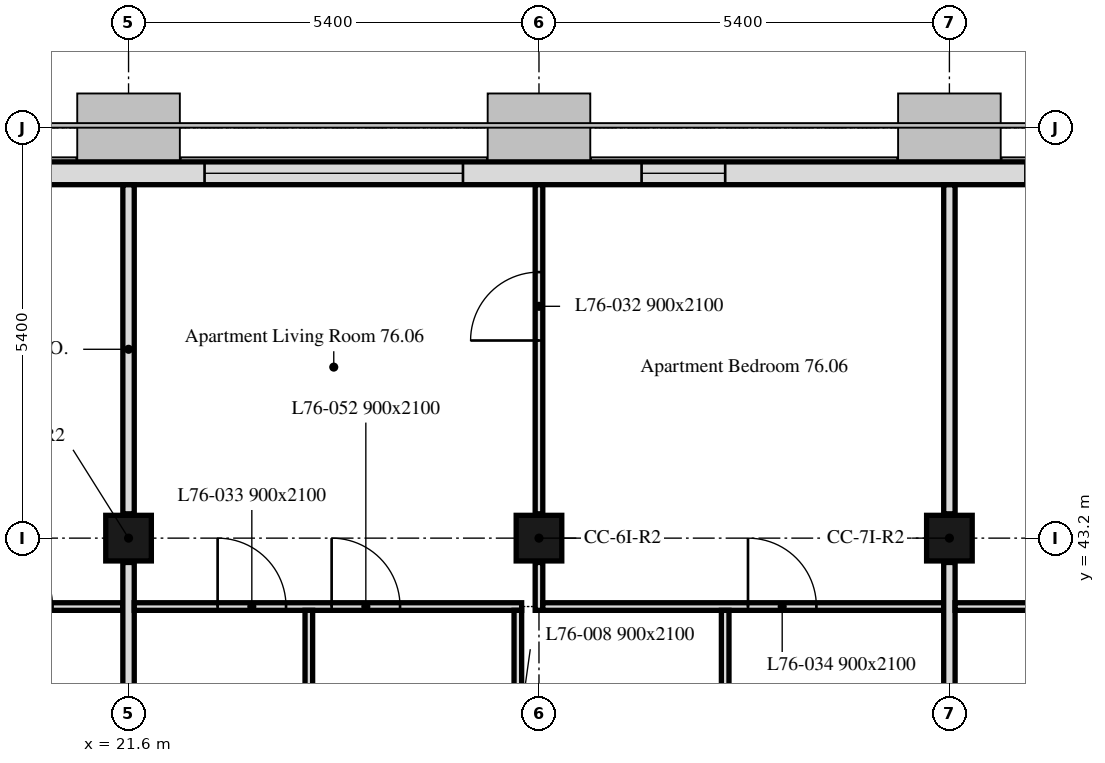
"""IFC4 building model, lengths in metres.
Left out: names, types, materials, properties, quantities, classifications, styles, units other than length and angle.
Written with IfcOpenShell. Run it as: python <this file> out.ifc"""

import sys

from ifc_helpers import new_model, si_unit, direction, frame, frame_2d, origin, origin_2d, place, context, subcontext, project, spatial, rectangle, extrude, element, fill, save


model = new_model("IFC4")
c1 = context("Model", 3, precision=1e-05, world=origin(), true_north=direction((0.0, 1.0)))
c2 = subcontext(c1, "Body", "Model", "MODEL_VIEW")
j1 = project(units=[si_unit("LENGTHUNIT", "METRE"), si_unit("PLANEANGLEUNIT", "RADIAN")], contexts=[c1])
p1 = place(None, origin())
s1 = spatial("IfcSite", under=j1, at=p1, CompositionType="ELEMENT")
p2 = place(p1, origin())
s2 = spatial("IfcBuilding", under=s1, at=p2, CompositionType="ELEMENT")
p3 = place(p2, frame((0.0, 0.0, 304.9)))
s3 = spatial("IfcBuildingStorey", under=s2, at=p3, CompositionType="ELEMENT", Elevation=304.9)
for number, where, z_axis, x_axis in (
    (1, (21.6, 43.2, 0.0), (0.0, 0.0, 1.0), (1.0, 0.0, 0.0)),
    (2, (27.0, 43.2, 0.0), (0.0, 0.0, 1.0), (1.0, 0.0, 0.0)),
    (3, (32.4, 43.2, 0.0), (0.0, 0.0, 1.0), (1.0, 0.0, 0.0)),
):
    element("IfcColumn", number, at=place(p3, frame(where, z_axis=z_axis, x_axis=x_axis)), inside=s3, PredefinedType="COLUMN", context=c2, shape_type="SweptSolid", body=[
        extrude(rectangle(XDim=0.6, YDim=0.6, at=origin_2d()), origin(), (0.0, 0.0, 1.0), 2.8),
    ])
p4 = place(p3, frame((43.014, 48.0, 0.0), z_axis=(0.0, 0.0, 1.0), x_axis=(-1.0, 0.0, 0.0)))
e4 = element("IfcWall", 4, at=p4, inside=s3, PredefinedType="SOLIDWALL", context=c2, shape_type="SweptSolid", body=[
    extrude(rectangle(XDim=32.027, YDim=0.3, at=frame_2d((16.014, 0.0))), origin(), (0.0, 0.0, 1.0), 2.8),
])
p5 = place(p4, frame((2.764, 0.0, 0.9)))
e5 = element("IfcOpeningElement", 5, at=p5, cuts=e4, PredefinedType="OPENING", context=c2, shape_type="SweptSolid", body=[
    extrude(rectangle(XDim=1.1, YDim=1.7, at=frame_2d((0.55, 0.85))), frame((0.0, 0.16, 0.0), z_axis=(0.0, -1.0, 0.0), x_axis=(1.0, 0.0, 0.0)), (0.0, 0.0, 1.0), 0.32),
])
p6 = place(p4, frame((6.214, 0.0, 0.9)))
e6 = element("IfcOpeningElement", 6, at=p6, cuts=e4, PredefinedType="OPENING", context=c2, shape_type="SweptSolid", body=[
    extrude(rectangle(XDim=3.4, YDim=1.7, at=frame_2d((1.7, 0.85))), frame((0.0, 0.16, 0.0), z_axis=(0.0, -1.0, 0.0), x_axis=(1.0, 0.0, 0.0)), (0.0, 0.0, 1.0), 0.32),
])
p7 = place(p4, frame((13.564, 0.0, 0.9)))
e7 = element("IfcOpeningElement", 7, at=p7, cuts=e4, PredefinedType="OPENING", context=c2, shape_type="SweptSolid", body=[
    extrude(rectangle(XDim=1.1, YDim=1.7, at=frame_2d((0.55, 0.85))), frame((0.0, 0.16, 0.0), z_axis=(0.0, -1.0, 0.0), x_axis=(1.0, 0.0, 0.0)), (0.0, 0.0, 1.0), 0.32),
])
p8 = place(p4, frame((17.014, 0.0, 0.9)))
e8 = element("IfcOpeningElement", 8, at=p8, cuts=e4, PredefinedType="OPENING", context=c2, shape_type="SweptSolid", body=[
    extrude(rectangle(XDim=3.4, YDim=1.7, at=frame_2d((1.7, 0.85))), frame((0.0, 0.16, 0.0), z_axis=(0.0, -1.0, 0.0), x_axis=(1.0, 0.0, 0.0)), (0.0, 0.0, 1.0), 0.32),
])
p9 = place(p4, frame((24.364, 0.0, 0.9)))
e9 = element("IfcOpeningElement", 9, at=p9, cuts=e4, PredefinedType="OPENING", context=c2, shape_type="SweptSolid", body=[
    extrude(rectangle(XDim=1.1, YDim=1.7, at=frame_2d((0.55, 0.85))), frame((0.0, 0.16, 0.0), z_axis=(0.0, -1.0, 0.0), x_axis=(1.0, 0.0, 0.0)), (0.0, 0.0, 1.0), 0.32),
])
p10 = place(p4, frame((27.814, 0.0, 0.9)))
e10 = element("IfcOpeningElement", 10, at=p10, cuts=e4, PredefinedType="OPENING", context=c2, shape_type="SweptSolid", body=[
    extrude(rectangle(XDim=3.4, YDim=1.7, at=frame_2d((1.7, 0.85))), frame((0.0, 0.16, 0.0), z_axis=(0.0, -1.0, 0.0), x_axis=(1.0, 0.0, 0.0)), (0.0, 0.0, 1.0), 0.32),
])
p11 = place(p3, frame((16.25, 42.3, 0.0), z_axis=(0.0, 0.0, 1.0), x_axis=(1.0, 0.0, 0.0)))
e11 = element("IfcWall", 11, at=p11, inside=s3, PredefinedType="PARTITIONING", context=c2, shape_type="SweptSolid", body=[
    extrude(rectangle(XDim=5.275, YDim=0.1, at=frame_2d((2.637, 0.0))), origin(), (0.0, 0.0, 1.0), 2.8),
])
p12 = place(p11, frame((2.08, 0.0, 0.0)))
e12 = element("IfcOpeningElement", 12, at=p12, cuts=e11, PredefinedType="OPENING", context=c2, shape_type="SweptSolid", body=[
    extrude(rectangle(XDim=0.9, YDim=2.1, at=frame_2d((0.45, 1.05))), frame((0.0, 0.05, 0.0), z_axis=(0.0, -1.0, 0.0), x_axis=(1.0, 0.0, 0.0)), (0.0, 0.0, 1.0), 0.1),
])
p13 = place(p11, frame((3.45, 0.0, 0.0)))
e13 = element("IfcOpeningElement", 13, at=p13, cuts=e11, PredefinedType="OPENING", context=c2, shape_type="SweptSolid", body=[
    extrude(rectangle(XDim=0.9, YDim=2.1, at=frame_2d((0.45, 1.05))), frame((0.0, 0.05, 0.0), z_axis=(0.0, -1.0, 0.0), x_axis=(1.0, 0.0, 0.0)), (0.0, 0.0, 1.0), 0.1),
])
p14 = place(p3, frame((21.6, 43.52, 0.0), z_axis=(0.0, 0.0, 1.0), x_axis=(0.0, 1.0, 0.0)))
e14 = element("IfcWall", 14, at=p14, inside=s3, PredefinedType="PARTITIONING", context=c2, shape_type="SweptSolid", body=[
    extrude(rectangle(XDim=4.329, YDim=0.15, at=frame_2d((2.165, 0.0))), origin(), (0.0, 0.0, 1.0), 2.2),
])
p15 = place(p3, frame((21.6, 38.12, 0.0), z_axis=(0.0, 0.0, 1.0), x_axis=(0.0, 1.0, 0.0)))
e15 = element("IfcWall", 15, at=p15, inside=s3, PredefinedType="PARTITIONING", context=c2, shape_type="SweptSolid", body=[
    extrude(rectangle(XDim=4.76, YDim=0.15, at=frame_2d((2.38, 0.0))), origin(), (0.0, 0.0, 1.0), 2.2),
])
p16 = place(p3, frame((21.675, 42.3, 0.0), z_axis=(0.0, 0.0, 1.0), x_axis=(1.0, 0.0, 0.0)))
e16 = element("IfcWall", 16, at=p16, inside=s3, PredefinedType="PARTITIONING", context=c2, shape_type="SweptSolid", body=[
    extrude(rectangle(XDim=5.097, YDim=0.1, at=frame_2d((2.548, 0.0))), origin(), (0.0, 0.0, 1.0), 2.8),
])
p17 = place(p16, frame((1.097, 0.0, 0.0)))
e17 = element("IfcOpeningElement", 17, at=p17, cuts=e16, PredefinedType="OPENING", context=c2, shape_type="SweptSolid", body=[
    extrude(rectangle(XDim=0.9, YDim=2.1, at=frame_2d((0.45, 1.05))), frame((0.0, 0.05, 0.0), z_axis=(0.0, -1.0, 0.0), x_axis=(1.0, 0.0, 0.0)), (0.0, 0.0, 1.0), 0.1),
])
p18 = place(p16, frame((2.597, 0.0, 0.0)))
e18 = element("IfcOpeningElement", 18, at=p18, cuts=e16, PredefinedType="OPENING", context=c2, shape_type="SweptSolid", body=[
    extrude(rectangle(XDim=0.9, YDim=2.1, at=frame_2d((0.45, 1.05))), frame((0.0, 0.05, 0.0), z_axis=(0.0, -1.0, 0.0), x_axis=(1.0, 0.0, 0.0)), (0.0, 0.0, 1.0), 0.1),
])
p19 = place(p3, frame((27.0, 42.25, 0.0), z_axis=(0.0, 0.0, 1.0), x_axis=(0.0, 1.0, 0.0)))
e19 = element("IfcWall", 19, at=p19, inside=s3, PredefinedType="PARTITIONING", context=c2, shape_type="SweptSolid", body=[
    extrude(rectangle(XDim=0.63, YDim=0.1, at=frame_2d((0.315, 0.0))), origin(), (0.0, 0.0, 1.0), 2.2),
])
p20 = place(p3, frame((27.0, 43.52, 0.0), z_axis=(0.0, 0.0, 1.0), x_axis=(0.0, 1.0, 0.0)))
e20 = element("IfcWall", 20, at=p20, inside=s3, PredefinedType="PARTITIONING", context=c2, shape_type="SweptSolid", body=[
    extrude(rectangle(XDim=4.329, YDim=0.1, at=frame_2d((2.165, 0.0))), origin(), (0.0, 0.0, 1.0), 2.2),
])
p21 = place(p20, frame((2.28, 0.0, 0.0)))
e21 = element("IfcOpeningElement", 21, at=p21, cuts=e20, PredefinedType="OPENING", context=c2, shape_type="SweptSolid", body=[
    extrude(rectangle(XDim=0.9, YDim=2.1, at=frame_2d((0.45, 1.05))), frame((0.0, 0.05, 0.0), z_axis=(0.0, -1.0, 0.0), x_axis=(1.0, 0.0, 0.0)), (0.0, 0.0, 1.0), 0.1),
])
p22 = place(p3, frame((27.05, 42.3, 0.0), z_axis=(0.0, 0.0, 1.0), x_axis=(1.0, 0.0, 0.0)))
e22 = element("IfcWall", 22, at=p22, inside=s3, PredefinedType="PARTITIONING", context=c2, shape_type="SweptSolid", body=[
    extrude(rectangle(XDim=5.275, YDim=0.1, at=frame_2d((2.637, 0.0))), origin(), (0.0, 0.0, 1.0), 2.8),
])
p23 = place(p22, frame((2.7, 0.0, 0.0)))
e23 = element("IfcOpeningElement", 23, at=p23, cuts=e22, PredefinedType="OPENING", context=c2, shape_type="SweptSolid", body=[
    extrude(rectangle(XDim=0.9, YDim=2.1, at=frame_2d((0.45, 1.05))), frame((0.0, 0.05, 0.0), z_axis=(0.0, -1.0, 0.0), x_axis=(1.0, 0.0, 0.0)), (0.0, 0.0, 1.0), 0.1),
])
p24 = place(p3, frame((32.4, 43.52, 0.0), z_axis=(0.0, 0.0, 1.0), x_axis=(0.0, 1.0, 0.0)))
e24 = element("IfcWall", 24, at=p24, inside=s3, PredefinedType="PARTITIONING", context=c2, shape_type="SweptSolid", body=[
    extrude(rectangle(XDim=4.329, YDim=0.15, at=frame_2d((2.165, 0.0))), origin(), (0.0, 0.0, 1.0), 2.2),
])
p25 = place(p3, frame((23.972, 34.275, 0.0), z_axis=(0.0, 0.0, 1.0), x_axis=(0.0, 1.0, 0.0)))
e25 = element("IfcWall", 25, at=p25, inside=s3, PredefinedType="PARTITIONING", context=c2, shape_type="SweptSolid", body=[
    extrude(rectangle(XDim=7.975, YDim=0.1, at=frame_2d((3.988, 0.0))), origin(), (0.0, 0.0, 1.0), 2.8),
])
p26 = place(p25, frame((0.825, 0.0, 0.0)))
e26 = element("IfcOpeningElement", 26, at=p26, cuts=e25, PredefinedType="OPENING", context=c2, shape_type="SweptSolid", body=[
    extrude(rectangle(XDim=0.9, YDim=2.1, at=frame_2d((0.45, 1.05))), frame((0.0, 0.05, 0.0), z_axis=(0.0, -1.0, 0.0), x_axis=(1.0, 0.0, 0.0)), (0.0, 0.0, 1.0), 0.1),
])
p27 = place(p25, frame((5.037, 0.0, 0.0)))
e27 = element("IfcOpeningElement", 27, at=p27, cuts=e25, PredefinedType="OPENING", context=c2, shape_type="SweptSolid", body=[
    extrude(rectangle(XDim=0.9, YDim=2.1, at=frame_2d((0.45, 1.05))), frame((0.0, 0.05, 0.0), z_axis=(0.0, -1.0, 0.0), x_axis=(1.0, 0.0, 0.0)), (0.0, 0.0, 1.0), 0.1),
])
p28 = place(p3, frame((26.722, 38.12, 0.0), z_axis=(0.0, 0.0, 1.0), x_axis=(0.0, 1.0, 0.0)))
e28 = element("IfcWall", 28, at=p28, inside=s3, PredefinedType="PARTITIONING", context=c2, shape_type="SweptSolid", body=[
    extrude(rectangle(XDim=4.13, YDim=0.1, at=frame_2d((2.065, 0.0))), origin(), (0.0, 0.0, 1.0), 2.8),
])
p29 = place(p28, frame((2.005, 0.0, 0.0)))
e29 = element("IfcOpeningElement", 29, at=p29, cuts=e28, PredefinedType="OPENING", context=c2, shape_type="SweptSolid", body=[
    extrude(rectangle(XDim=0.9, YDim=2.1, at=frame_2d((0.45, 1.05))), frame((0.0, 0.05, 0.0), z_axis=(0.0, -1.0, 0.0), x_axis=(1.0, 0.0, 0.0)), (0.0, 0.0, 1.0), 0.1),
])
p30 = place(p3, frame((29.45, 36.95, 0.0), z_axis=(0.0, 0.0, 1.0), x_axis=(0.0, 1.0, 0.0)))
e30 = element("IfcWall", 30, at=p30, inside=s3, PredefinedType="PARTITIONING", context=c2, shape_type="SweptSolid", body=[
    extrude(rectangle(XDim=5.3, YDim=0.1, at=frame_2d((2.65, 0.0))), origin(), (0.0, 0.0, 1.0), 2.8),
])
p31 = place(p3, frame((32.4, 38.12, 0.0), z_axis=(0.0, 0.0, 1.0), x_axis=(0.0, 1.0, 0.0)))
e31 = element("IfcWall", 31, at=p31, inside=s3, PredefinedType="PARTITIONING", context=c2, shape_type="SweptSolid", body=[
    extrude(rectangle(XDim=4.76, YDim=0.15, at=frame_2d((2.38, 0.0))), origin(), (0.0, 0.0, 1.0), 2.2),
])
p32 = place(p3, frame((32.475, 42.3, 0.0), z_axis=(0.0, 0.0, 1.0), x_axis=(1.0, 0.0, 0.0)))
e32 = element("IfcWall", 32, at=p32, inside=s3, PredefinedType="PARTITIONING", context=c2, shape_type="SweptSolid", body=[
    extrude(rectangle(XDim=5.21, YDim=0.1, at=frame_2d((2.605, 0.0))), origin(), (0.0, 0.0, 1.0), 2.8),
])
p33 = place(p32, frame((1.46, 0.0, 0.0)))
e33 = element("IfcOpeningElement", 33, at=p33, cuts=e32, PredefinedType="OPENING", context=c2, shape_type="SweptSolid", body=[
    extrude(rectangle(XDim=0.9, YDim=2.1, at=frame_2d((0.45, 1.05))), frame((0.0, 0.05, 0.0), z_axis=(0.0, -1.0, 0.0), x_axis=(1.0, 0.0, 0.0)), (0.0, 0.0, 1.0), 0.1),
])
p34 = place(p7, origin())
e34 = element("IfcWindow", 34, at=p34, inside=s3, PartitioningType="SINGLE_PANEL", PredefinedType="WINDOW", context=c2, shape_type="SweptSolid", body=[
    extrude(rectangle(XDim=1.1, YDim=1.7, at=frame_2d((0.55, 0.85))), frame((0.0, 0.03, 0.0), z_axis=(0.0, -1.0, 0.0), x_axis=(1.0, 0.0, 0.0)), (0.0, 0.0, 1.0), 0.06),
])
fill(e7, e34)
p35 = place(p8, origin())
e35 = element("IfcWindow", 35, at=p35, inside=s3, PartitioningType="SINGLE_PANEL", PredefinedType="WINDOW", context=c2, shape_type="SweptSolid", body=[
    extrude(rectangle(XDim=3.4, YDim=1.7, at=frame_2d((1.7, 0.85))), frame((0.0, 0.03, 0.0), z_axis=(0.0, -1.0, 0.0), x_axis=(1.0, 0.0, 0.0)), (0.0, 0.0, 1.0), 0.06),
])
fill(e8, e35)
p36 = place(p21, origin())
e36 = element("IfcDoor", 36, at=p36, inside=s3, OperationType="SINGLE_SWING_RIGHT", PredefinedType="DOOR", context=c2, shape_type="SweptSolid", body=[
    extrude(rectangle(XDim=0.9, YDim=2.1, at=frame_2d((0.45, 1.05))), frame((0.0, 0.025, 0.0), z_axis=(0.0, -1.0, 0.0), x_axis=(1.0, 0.0, 0.0)), (0.0, 0.0, 1.0), 0.05),
])
fill(e21, e36)
p37 = place(p17, origin())
e37 = element("IfcDoor", 37, at=p37, inside=s3, OperationType="SINGLE_SWING_RIGHT", PredefinedType="DOOR", context=c2, shape_type="SweptSolid", body=[
    extrude(rectangle(XDim=0.9, YDim=2.1, at=frame_2d((0.45, 1.05))), frame((0.0, 0.025, 0.0), z_axis=(0.0, -1.0, 0.0), x_axis=(1.0, 0.0, 0.0)), (0.0, 0.0, 1.0), 0.05),
])
fill(e17, e37)
p38 = place(p23, origin())
e38 = element("IfcDoor", 38, at=p38, inside=s3, OperationType="SINGLE_SWING_LEFT", PredefinedType="DOOR", context=c2, shape_type="SweptSolid", body=[
    extrude(rectangle(XDim=0.9, YDim=2.1, at=frame_2d((0.45, 1.05))), frame((0.0, 0.025, 0.0), z_axis=(0.0, -1.0, 0.0), x_axis=(1.0, 0.0, 0.0)), (0.0, 0.0, 1.0), 0.05),
])
fill(e23, e38)
p39 = place(p18, origin())
e39 = element("IfcDoor", 39, at=p39, inside=s3, OperationType="SINGLE_SWING_LEFT", PredefinedType="DOOR", context=c2, shape_type="SweptSolid", body=[
    extrude(rectangle(XDim=0.9, YDim=2.1, at=frame_2d((0.45, 1.05))), frame((0.0, 0.025, 0.0), z_axis=(0.0, -1.0, 0.0), x_axis=(1.0, 0.0, 0.0)), (0.0, 0.0, 1.0), 0.05),
])
fill(e18, e39)
save(model, sys.argv[1])
